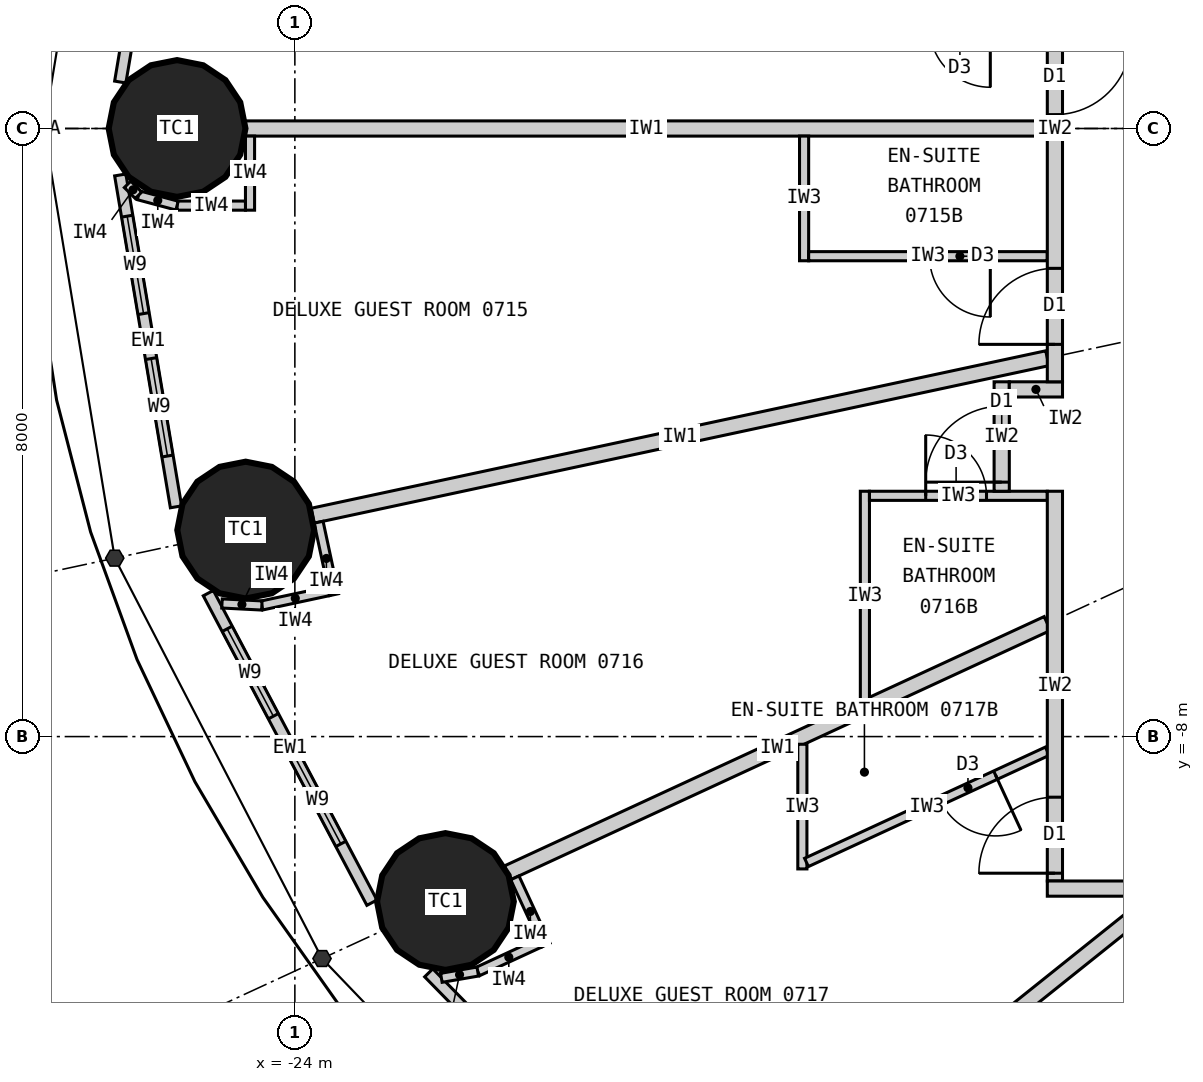
"""IFC4 building model, lengths in metres.
Left out: names, types, materials, properties, quantities, classifications, styles, units other than length and angle.
Written with IfcOpenShell. Run it as: python <this file> out.ifc"""

import sys

from ifc_helpers import new_model, si_unit, direction, frame, frame_2d, origin, origin_2d, place, context, subcontext, project, spatial, rectangle, circle, extrude, element, fill, save


model = new_model("IFC4")
c1 = context("Model", 3, precision=1e-05, world=origin(), true_north=direction((0.0, 1.0)))
c2 = subcontext(c1, "Body", "Model", "MODEL_VIEW")
j1 = project(units=[si_unit("LENGTHUNIT", "METRE"), si_unit("PLANEANGLEUNIT", "RADIAN")], contexts=[c1])
p1 = place(None, origin())
s1 = spatial("IfcSite", under=j1, at=p1, CompositionType="ELEMENT")
p2 = place(p1, origin())
s2 = spatial("IfcBuilding", under=s1, at=p2, CompositionType="ELEMENT")
p3 = place(p2, frame((0.0, 0.0, 36.0)))
s3 = spatial("IfcBuildingStorey", under=s2, at=p3, CompositionType="ELEMENT", Elevation=36.0)
for number, where, z_axis, x_axis in (
    (1, (-25.55, 0.0, 0.0), (0.0, 0.0, 1.0), (1.0, 0.0, 0.0)),
    (2, (-24.647, -5.283, 0.0), (0.0, 0.0, 1.0), (1.0, 0.0, 0.0)),
    (3, (-22.019, -10.17, 0.0), (0.0, 0.0, 1.0), (1.0, 0.0, 0.0)),
):
    element("IfcColumn", number, at=place(p3, frame(where, z_axis=z_axis, x_axis=x_axis)), inside=s3, PredefinedType="COLUMN", context=c2, shape_type="SweptSolid", body=[
        extrude(circle(Radius=0.9, at=origin_2d()), origin(), (0.0, 0.0, 1.0), 3.3),
    ])
p4 = place(p3, frame((-25.564, 4.978, 0.0), z_axis=(0.0, 0.0, 1.0), x_axis=(-0.165641751141, -0.986185991727, 0.0)))
e4 = element("IfcWall", 4, at=p4, inside=s3, PredefinedType="ELEMENTEDWALL", context=c2, shape_type="SweptSolid", body=[
    extrude(rectangle(XDim=4.428, YDim=0.15, at=frame_2d((2.214, 0.0))), origin(), (0.0, 0.0, 1.0), 3.12),
])
p5 = place(p4, frame((0.678, 0.0, 0.9)))
e5 = element("IfcOpeningElement", 5, at=p5, cuts=e4, PredefinedType="OPENING", context=c2, shape_type="SweptSolid", body=[
    extrude(rectangle(XDim=1.3, YDim=1.9, at=frame_2d((0.65, 0.95))), frame((0.0, 0.085, 0.0), z_axis=(0.0, -1.0, 0.0), x_axis=(1.0, 0.0, 0.0)), (0.0, 0.0, 1.0), 0.17),
])
p6 = place(p4, frame((2.578, 0.0, 0.9)))
e6 = element("IfcOpeningElement", 6, at=p6, cuts=e4, PredefinedType="OPENING", context=c2, shape_type="SweptSolid", body=[
    extrude(rectangle(XDim=1.3, YDim=1.9, at=frame_2d((0.65, 0.95))), frame((0.0, 0.085, 0.0), z_axis=(0.0, -1.0, 0.0), x_axis=(1.0, 0.0, 0.0)), (0.0, 0.0, 1.0), 0.17),
])
p7 = place(p3, frame((-26.297, -0.611, 0.0), z_axis=(0.0, 0.0, 1.0), x_axis=(0.165641751141, -0.986185991727, 0.0)))
e7 = element("IfcWall", 7, at=p7, inside=s3, PredefinedType="ELEMENTEDWALL", context=c2, shape_type="SweptSolid", body=[
    extrude(rectangle(XDim=4.428, YDim=0.15, at=frame_2d((2.214, 0.0))), origin(), (0.0, 0.0, 1.0), 3.12),
])
p8 = place(p7, frame((0.55, 0.0, 0.9)))
e8 = element("IfcOpeningElement", 8, at=p8, cuts=e7, PredefinedType="OPENING", context=c2, shape_type="SweptSolid", body=[
    extrude(rectangle(XDim=1.3, YDim=1.9, at=frame_2d((0.65, 0.95))), frame((0.0, 0.085, 0.0), z_axis=(0.0, -1.0, 0.0), x_axis=(1.0, 0.0, 0.0)), (0.0, 0.0, 1.0), 0.17),
])
p9 = place(p7, frame((2.45, 0.0, 0.9)))
e9 = element("IfcOpeningElement", 9, at=p9, cuts=e7, PredefinedType="OPENING", context=c2, shape_type="SweptSolid", body=[
    extrude(rectangle(XDim=1.3, YDim=1.9, at=frame_2d((0.65, 0.95))), frame((0.0, 0.085, 0.0), z_axis=(0.0, -1.0, 0.0), x_axis=(1.0, 0.0, 0.0)), (0.0, 0.0, 1.0), 0.17),
])
p10 = place(p3, frame((-25.139, -6.113, 0.0), z_axis=(0.0, 0.0, 1.0), x_axis=(0.467303182954, -0.884097129959, 0.0)))
e10 = element("IfcWall", 10, at=p10, inside=s3, PredefinedType="ELEMENTEDWALL", context=c2, shape_type="SweptSolid", body=[
    extrude(rectangle(XDim=4.606, YDim=0.15, at=frame_2d((2.303, 0.0))), origin(), (0.0, 0.0, 1.0), 3.12),
])
p11 = place(p10, frame((0.531, 0.0, 0.9)))
e11 = element("IfcOpeningElement", 11, at=p11, cuts=e10, PredefinedType="OPENING", context=c2, shape_type="SweptSolid", body=[
    extrude(rectangle(XDim=1.3, YDim=1.9, at=frame_2d((0.65, 0.95))), frame((0.0, 0.085, 0.0), z_axis=(0.0, -1.0, 0.0), x_axis=(1.0, 0.0, 0.0)), (0.0, 0.0, 1.0), 0.17),
])
p12 = place(p10, frame((2.432, 0.0, 0.9)))
e12 = element("IfcOpeningElement", 12, at=p12, cuts=e10, PredefinedType="OPENING", context=c2, shape_type="SweptSolid", body=[
    extrude(rectangle(XDim=1.3, YDim=1.9, at=frame_2d((0.65, 0.95))), frame((0.0, 0.085, 0.0), z_axis=(0.0, -1.0, 0.0), x_axis=(1.0, 0.0, 0.0)), (0.0, 0.0, 1.0), 0.17),
])
p13 = place(p3, frame((-22.239, -11.108, 0.0), z_axis=(0.0, 0.0, 1.0), x_axis=(0.699612594083, -0.714522370679, 0.0)))
e13 = element("IfcWall", 13, at=p13, inside=s3, PredefinedType="ELEMENTEDWALL", context=c2, shape_type="SweptSolid", body=[
    extrude(rectangle(XDim=4.896, YDim=0.15, at=frame_2d((2.448, 0.0))), origin(), (0.0, 0.0, 1.0), 3.12),
])
p14 = place(p13, frame((0.619, 0.0, 0.9)))
e14 = element("IfcOpeningElement", 14, at=p14, cuts=e13, PredefinedType="OPENING", context=c2, shape_type="SweptSolid", body=[
    extrude(rectangle(XDim=1.3, YDim=1.9, at=frame_2d((0.65, 0.95))), frame((0.0, 0.085, 0.0), z_axis=(0.0, -1.0, 0.0), x_axis=(1.0, 0.0, 0.0)), (0.0, 0.0, 1.0), 0.17),
])
p15 = place(p13, frame((2.519, 0.0, 0.9)))
e15 = element("IfcOpeningElement", 15, at=p15, cuts=e13, PredefinedType="OPENING", context=c2, shape_type="SweptSolid", body=[
    extrude(rectangle(XDim=1.3, YDim=1.9, at=frame_2d((0.65, 0.95))), frame((0.0, 0.085, 0.0), z_axis=(0.0, -1.0, 0.0), x_axis=(1.0, 0.0, 0.0)), (0.0, 0.0, 1.0), 0.17),
])
p16 = place(p3, frame((-14.1, 0.0, 0.0), z_axis=(0.0, 0.0, 1.0), x_axis=(-1.0, 0.0, 0.0)))
e16 = element("IfcWall", 16, at=p16, inside=s3, PredefinedType="PARTITIONING", context=c2, shape_type="SweptSolid", body=[
    extrude(rectangle(XDim=10.55, YDim=0.2, at=frame_2d((5.275, 0.0))), origin(), (0.0, 0.0, 1.0), 2.27),
])
p17 = place(p3, frame((-14.1, -3.022, 0.0), z_axis=(0.0, 0.0, 1.0), x_axis=(-0.977786510688, -0.209603290805, 0.0)))
e17 = element("IfcWall", 17, at=p17, inside=s3, PredefinedType="PARTITIONING", context=c2, shape_type="SweptSolid", body=[
    extrude(rectangle(XDim=9.887, YDim=0.2, at=frame_2d((4.943, 0.0))), origin(), (0.0, 0.0, 1.0), 2.32),
])
p18 = place(p3, frame((-14.1, -6.512, 0.0), z_axis=(0.0, 0.0, 1.0), x_axis=(-0.907842433118, -0.41931147925, 0.0)))
e18 = element("IfcWall", 18, at=p18, inside=s3, PredefinedType="PARTITIONING", context=c2, shape_type="SweptSolid", body=[
    extrude(rectangle(XDim=7.823, YDim=0.2, at=frame_2d((3.912, 0.0))), origin(), (0.0, 0.0, 1.0), 2.32),
])
p19 = place(p3, frame((-12.625, -10.1, 0.0), z_axis=(0.0, 0.0, 1.0), x_axis=(-0.780872884676, -0.624689953479, 0.0)))
e19 = element("IfcWall", 19, at=p19, inside=s3, PredefinedType="PARTITIONING", context=c2, shape_type="SweptSolid", body=[
    extrude(rectangle(XDim=5.845, YDim=0.2, at=frame_2d((2.922, 0.0))), origin(), (0.0, 0.0, 1.0), 2.32),
])
p20 = place(p3, frame((-17.3, -0.1, 0.0), z_axis=(0.0, 0.0, 1.0), x_axis=(0.0, -1.0, 0.0)))
e20 = element("IfcWall", 20, at=p20, inside=s3, PredefinedType="PARTITIONING", context=c2, shape_type="SweptSolid", body=[
    extrude(rectangle(XDim=1.64, YDim=0.12, at=frame_2d((0.82, 0.0))), origin(), (0.0, 0.0, 1.0), 3.12),
])
p21 = place(p3, frame((-14.1, -1.68, 0.0), z_axis=(0.0, 0.0, 1.0), x_axis=(-1.0, 0.0, 0.0)))
e21 = element("IfcWall", 21, at=p21, inside=s3, PredefinedType="PARTITIONING", context=c2, shape_type="SweptSolid", body=[
    extrude(rectangle(XDim=3.14, YDim=0.12, at=frame_2d((1.57, 0.0))), origin(), (0.0, 0.0, 1.0), 3.12),
])
p22 = place(p21, frame((0.75, 0.0, 0.0)))
e22 = element("IfcOpeningElement", 22, at=p22, cuts=e21, PredefinedType="OPENING", context=c2, shape_type="SweptSolid", body=[
    extrude(rectangle(XDim=0.8, YDim=2.1, at=frame_2d((0.4, 1.05))), frame((0.0, 0.07, 0.0), z_axis=(0.0, -1.0, 0.0), x_axis=(1.0, 0.0, 0.0)), (0.0, 0.0, 1.0), 0.14),
])
p23 = place(p3, frame((-16.5, -7.521, 0.0), z_axis=(0.0, 0.0, 1.0), x_axis=(0.0, 1.0, 0.0)))
e23 = element("IfcWall", 23, at=p23, inside=s3, PredefinedType="PARTITIONING", context=c2, shape_type="SweptSolid", body=[
    extrude(rectangle(XDim=2.749, YDim=0.12, at=frame_2d((1.374, 0.0))), origin(), (0.0, 0.0, 1.0), 3.12),
])
p24 = place(p3, frame((-14.1, -4.833, 0.0), z_axis=(0.0, 0.0, 1.0), x_axis=(-1.0, 0.0, 0.0)))
e24 = element("IfcWall", 24, at=p24, inside=s3, PredefinedType="PARTITIONING", context=c2, shape_type="SweptSolid", body=[
    extrude(rectangle(XDim=2.34, YDim=0.12, at=frame_2d((1.17, 0.0))), origin(), (0.0, 0.0, 1.0), 3.12),
])
p25 = place(p24, frame((0.8, 0.0, 0.0)))
e25 = element("IfcOpeningElement", 25, at=p25, cuts=e24, PredefinedType="OPENING", context=c2, shape_type="SweptSolid", body=[
    extrude(rectangle(XDim=0.8, YDim=2.1, at=frame_2d((0.4, 1.05))), frame((0.0, 0.07, 0.0), z_axis=(0.0, -1.0, 0.0), x_axis=(1.0, 0.0, 0.0)), (0.0, 0.0, 1.0), 0.14),
])
p26 = place(p3, frame((-17.323, -8.101, 0.0), z_axis=(0.0, 0.0, 1.0), x_axis=(0.0, -1.0, 0.0)))
e26 = element("IfcWall", 26, at=p26, inside=s3, PredefinedType="PARTITIONING", context=c2, shape_type="SweptSolid", body=[
    extrude(rectangle(XDim=1.64, YDim=0.12, at=frame_2d((0.82, 0.0))), origin(), (0.0, 0.0, 1.0), 3.12),
])
p27 = place(p3, frame((-14.1, -8.193, 0.0), z_axis=(0.0, 0.0, 1.0), x_axis=(-0.907836493557, -0.419324338628, 0.0)))
e27 = element("IfcWall", 27, at=p27, inside=s3, PredefinedType="PARTITIONING", context=c2, shape_type="SweptSolid", body=[
    extrude(rectangle(XDim=3.49, YDim=0.12, at=frame_2d((1.745, 0.0))), origin(), (0.0, 0.0, 1.0), 3.12),
])
p28 = place(p27, frame((0.75, 0.0, 0.0)))
e28 = element("IfcOpeningElement", 28, at=p28, cuts=e27, PredefinedType="OPENING", context=c2, shape_type="SweptSolid", body=[
    extrude(rectangle(XDim=0.8, YDim=2.1, at=frame_2d((0.4, 1.05))), frame((0.0, 0.07, 0.0), z_axis=(0.0, -1.0, 0.0), x_axis=(1.0, 0.0, 0.0)), (0.0, 0.0, 1.0), 0.14),
])
p29 = place(p3, frame((-14.7, -3.333, 0.0), z_axis=(0.0, 0.0, 1.0), x_axis=(0.0, -1.0, 0.0)))
e29 = element("IfcWall", 29, at=p29, inside=s3, PredefinedType="PARTITIONING", context=c2, shape_type="SweptSolid", body=[
    extrude(rectangle(XDim=1.44, YDim=0.2, at=frame_2d((0.72, 0.0))), origin(), (0.0, 0.0, 1.0), 3.12),
])
p30 = place(p29, frame((0.32, 0.0, 0.0)))
e30 = element("IfcOpeningElement", 30, at=p30, cuts=e29, PredefinedType="OPENING", context=c2, shape_type="SweptSolid", body=[
    extrude(rectangle(XDim=1.0, YDim=2.2, at=frame_2d((0.5, 1.1))), frame((0.0, 0.11, 0.0), z_axis=(0.0, -1.0, 0.0), x_axis=(1.0, 0.0, 0.0)), (0.0, 0.0, 1.0), 0.22),
])
p31 = place(p3, frame((-13.9, -3.433, 0.0), z_axis=(0.0, 0.0, 1.0), x_axis=(-1.0, 0.0, 0.0)))
e31 = element("IfcWall", 31, at=p31, inside=s3, PredefinedType="PARTITIONING", context=c2, shape_type="SweptSolid", body=[
    extrude(rectangle(XDim=0.7, YDim=0.2, at=frame_2d((0.35, 0.0))), origin(), (0.0, 0.0, 1.0), 2.32),
])
p32 = place(p3, frame((-14.0, 3.333, 0.0), z_axis=(0.0, 0.0, 1.0), x_axis=(0.0, -1.0, 0.0)))
e32 = element("IfcWall", 32, at=p32, inside=s3, PredefinedType="PARTITIONING", context=c2, shape_type="SweptSolid", body=[
    extrude(rectangle(XDim=6.665, YDim=0.2, at=frame_2d((3.333, 0.0))), origin(), (0.0, 0.0, 1.0), 3.12),
])
p33 = place(p32, frame((2.15, 0.0, 0.0)))
e33 = element("IfcOpeningElement", 33, at=p33, cuts=e32, PredefinedType="OPENING", context=c2, shape_type="SweptSolid", body=[
    extrude(rectangle(XDim=1.0, YDim=2.2, at=frame_2d((0.5, 1.1))), frame((0.0, 0.11, 0.0), z_axis=(0.0, -1.0, 0.0), x_axis=(1.0, 0.0, 0.0)), (0.0, 0.0, 1.0), 0.22),
])
p34 = place(p32, frame((5.173, 0.0, 0.0)))
e34 = element("IfcOpeningElement", 34, at=p34, cuts=e32, PredefinedType="OPENING", context=c2, shape_type="SweptSolid", body=[
    extrude(rectangle(XDim=1.0, YDim=2.2, at=frame_2d((0.5, 1.1))), frame((0.0, 0.11, 0.0), z_axis=(0.0, -1.0, 0.0), x_axis=(1.0, 0.0, 0.0)), (0.0, 0.0, 1.0), 0.22),
])
p35 = place(p3, frame((-14.0, -4.772, 0.0), z_axis=(0.0, 0.0, 1.0), x_axis=(0.0, -1.0, 0.0)))
e35 = element("IfcWall", 35, at=p35, inside=s3, PredefinedType="PARTITIONING", context=c2, shape_type="SweptSolid", body=[
    extrude(rectangle(XDim=5.127, YDim=0.2, at=frame_2d((2.564, 0.0))), origin(), (0.0, 0.0, 1.0), 3.12),
])
p36 = place(p35, frame((4.025, 0.0, 0.0)))
e36 = element("IfcOpeningElement", 36, at=p36, cuts=e35, PredefinedType="OPENING", context=c2, shape_type="SweptSolid", body=[
    extrude(rectangle(XDim=1.0, YDim=2.2, at=frame_2d((0.5, 1.1))), frame((0.0, 0.11, 0.0), z_axis=(0.0, -1.0, 0.0), x_axis=(1.0, 0.0, 0.0)), (0.0, 0.0, 1.0), 0.22),
])
p37 = place(p3, frame((-3.499, -10.0, 0.0), z_axis=(0.0, 0.0, 1.0), x_axis=(-1.0, 0.0, 0.0)))
e37 = element("IfcWall", 37, at=p37, inside=s3, PredefinedType="PARTITIONING", context=c2, shape_type="SweptSolid", body=[
    extrude(rectangle(XDim=10.602, YDim=0.2, at=frame_2d((5.301, 0.0))), origin(), (0.0, 0.0, 1.0), 3.12),
])
p38 = place(p37, frame((4.846, 0.0, 0.0)))
e38 = element("IfcOpeningElement", 38, at=p38, cuts=e37, PredefinedType="OPENING", context=c2, shape_type="SweptSolid", body=[
    extrude(rectangle(XDim=1.0, YDim=2.2, at=frame_2d((0.5, 1.1))), frame((0.0, 0.11, 0.0), z_axis=(0.0, -1.0, 0.0), x_axis=(1.0, 0.0, 0.0)), (0.0, 0.0, 1.0), 0.22),
])
p39 = place(p3, frame((-24.59, -0.1, 0.0), z_axis=(0.0, 0.0, 1.0), x_axis=(0.0, -1.0, 0.0)))
e39 = element("IfcWall", 39, at=p39, inside=s3, PredefinedType="PARTITIONING", context=c2, shape_type="SweptSolid", body=[
    extrude(rectangle(XDim=0.974, YDim=0.12, at=frame_2d((0.487, 0.0))), origin(), (0.0, 0.0, 1.0), 3.12),
])
p40 = place(p3, frame((-24.65, -1.015, 0.0), z_axis=(0.0, 0.0, 1.0), x_axis=(-1.0, 0.0, 0.0)))
e40 = element("IfcWall", 40, at=p40, inside=s3, PredefinedType="PARTITIONING", context=c2, shape_type="SweptSolid", body=[
    extrude(rectangle(XDim=0.9, YDim=0.12, at=frame_2d((0.45, 0.0))), origin(), (0.0, 0.0, 1.0), 3.12),
])
p41 = place(p3, frame((-25.55, -1.015, 0.0), z_axis=(0.0, 0.0, 1.0), x_axis=(-0.96590239779, 0.258906465625, 0.0)))
e41 = element("IfcWall", 41, at=p41, inside=s3, PredefinedType="PARTITIONING", context=c2, shape_type="SweptSolid", body=[
    extrude(rectangle(XDim=0.525, YDim=0.12, at=frame_2d((0.263, 0.0))), origin(), (0.0, 0.0, 1.0), 3.12),
])
p42 = place(p3, frame((-26.057, -0.879, 0.0), z_axis=(0.0, 0.0, 1.0), x_axis=(-0.707106781187, 0.707106781187, 0.0)))
e42 = element("IfcWall", 42, at=p42, inside=s3, PredefinedType="PARTITIONING", context=c2, shape_type="SweptSolid", body=[
    extrude(rectangle(XDim=0.204, YDim=0.12, at=frame_2d((0.102, 0.0))), origin(), (0.0, 0.0, 1.0), 3.12),
])
p43 = place(p3, frame((-23.687, -5.18, 0.0), z_axis=(0.0, 0.0, 1.0), x_axis=(0.209443540911, -0.977820741839, 0.0)))
e43 = element("IfcWall", 43, at=p43, inside=s3, PredefinedType="PARTITIONING", context=c2, shape_type="SweptSolid", body=[
    extrude(rectangle(XDim=0.975, YDim=0.12, at=frame_2d((0.487, 0.0))), origin(), (0.0, 0.0, 1.0), 3.12),
])
p44 = place(p3, frame((-23.554, -6.087, 0.0), z_axis=(0.0, 0.0, 1.0), x_axis=(-0.977762694187, -0.209714362543, 0.0)))
e44 = element("IfcWall", 44, at=p44, inside=s3, PredefinedType="PARTITIONING", context=c2, shape_type="SweptSolid", body=[
    extrude(rectangle(XDim=0.9, YDim=0.12, at=frame_2d((0.45, 0.0))), origin(), (0.0, 0.0, 1.0), 3.12),
])
p45 = place(p3, frame((-24.434, -6.275, 0.0), z_axis=(0.0, 0.0, 1.0), x_axis=(-0.998714959873, 0.050679669751, 0.0)))
e45 = element("IfcWall", 45, at=p45, inside=s3, PredefinedType="PARTITIONING", context=c2, shape_type="SweptSolid", body=[
    extrude(rectangle(XDim=0.525, YDim=0.12, at=frame_2d((0.263, 0.0))), origin(), (0.0, 0.0, 1.0), 3.12),
])
p46 = place(p3, frame((-21.106, -9.858, 0.0), z_axis=(0.0, 0.0, 1.0), x_axis=(0.419344098106, -0.907827366509, 0.0)))
e46 = element("IfcWall", 46, at=p46, inside=s3, PredefinedType="PARTITIONING", context=c2, shape_type="SweptSolid", body=[
    extrude(rectangle(XDim=0.975, YDim=0.12, at=frame_2d((0.487, 0.0))), origin(), (0.0, 0.0, 1.0), 3.12),
])
p47 = place(p3, frame((-20.777, -10.714, 0.0), z_axis=(0.0, 0.0, 1.0), x_axis=(-0.907832324198, -0.419333365166, 0.0)))
e47 = element("IfcWall", 47, at=p47, inside=s3, PredefinedType="PARTITIONING", context=c2, shape_type="SweptSolid", body=[
    extrude(rectangle(XDim=0.9, YDim=0.12, at=frame_2d((0.45, 0.0))), origin(), (0.0, 0.0, 1.0), 3.12),
])
p48 = place(p3, frame((-21.594, -11.091, 0.0), z_axis=(0.0, 0.0, 1.0), x_axis=(-0.985483306792, -0.169772353566, 0.0)))
e48 = element("IfcWall", 48, at=p48, inside=s3, PredefinedType="PARTITIONING", context=c2, shape_type="SweptSolid", body=[
    extrude(rectangle(XDim=0.486, YDim=0.12, at=frame_2d((0.243, 0.0))), origin(), (0.0, 0.0, 1.0), 3.12),
])
p49 = place(p8, origin())
e49 = element("IfcWindow", 49, at=p49, inside=s3, PartitioningType="SINGLE_PANEL", PredefinedType="WINDOW", context=c2, shape_type="SweptSolid", body=[
    extrude(rectangle(XDim=1.3, YDim=1.9, at=frame_2d((0.65, 0.95))), frame((0.0, 0.03, 0.0), z_axis=(0.0, -1.0, 0.0), x_axis=(1.0, 0.0, 0.0)), (0.0, 0.0, 1.0), 0.06),
])
fill(e8, e49)
p50 = place(p9, origin())
e50 = element("IfcWindow", 50, at=p50, inside=s3, PartitioningType="SINGLE_PANEL", PredefinedType="WINDOW", context=c2, shape_type="SweptSolid", body=[
    extrude(rectangle(XDim=1.3, YDim=1.9, at=frame_2d((0.65, 0.95))), frame((0.0, 0.03, 0.0), z_axis=(0.0, -1.0, 0.0), x_axis=(1.0, 0.0, 0.0)), (0.0, 0.0, 1.0), 0.06),
])
fill(e9, e50)
p51 = place(p11, origin())
e51 = element("IfcWindow", 51, at=p51, inside=s3, PartitioningType="SINGLE_PANEL", PredefinedType="WINDOW", context=c2, shape_type="SweptSolid", body=[
    extrude(rectangle(XDim=1.3, YDim=1.9, at=frame_2d((0.65, 0.95))), frame((0.0, 0.03, 0.0), z_axis=(0.0, -1.0, 0.0), x_axis=(1.0, 0.0, 0.0)), (0.0, 0.0, 1.0), 0.06),
])
fill(e11, e51)
p52 = place(p12, origin())
e52 = element("IfcWindow", 52, at=p52, inside=s3, PartitioningType="SINGLE_PANEL", PredefinedType="WINDOW", context=c2, shape_type="SweptSolid", body=[
    extrude(rectangle(XDim=1.3, YDim=1.9, at=frame_2d((0.65, 0.95))), frame((0.0, 0.03, 0.0), z_axis=(0.0, -1.0, 0.0), x_axis=(1.0, 0.0, 0.0)), (0.0, 0.0, 1.0), 0.06),
])
fill(e12, e52)
p53 = place(p33, origin())
e53 = element("IfcDoor", 53, at=p53, inside=s3, OperationType="SINGLE_SWING_LEFT", PredefinedType="DOOR", context=c2, shape_type="SweptSolid", body=[
    extrude(rectangle(XDim=1.0, YDim=2.2, at=frame_2d((0.5, 1.1))), frame((0.0, 0.025, 0.0), z_axis=(0.0, -1.0, 0.0), x_axis=(1.0, 0.0, 0.0)), (0.0, 0.0, 1.0), 0.05),
])
fill(e33, e53)
p54 = place(p22, origin())
e54 = element("IfcDoor", 54, at=p54, inside=s3, OperationType="SINGLE_SWING_LEFT", PredefinedType="DOOR", context=c2, shape_type="SweptSolid", body=[
    extrude(rectangle(XDim=0.8, YDim=2.1, at=frame_2d((0.4, 1.05))), frame((0.0, 0.025, 0.0), z_axis=(0.0, -1.0, 0.0), x_axis=(1.0, 0.0, 0.0)), (0.0, 0.0, 1.0), 0.05),
])
fill(e22, e54)
p55 = place(p34, origin())
e55 = element("IfcDoor", 55, at=p55, inside=s3, OperationType="SINGLE_SWING_RIGHT", PredefinedType="DOOR", context=c2, shape_type="SweptSolid", body=[
    extrude(rectangle(XDim=1.0, YDim=2.2, at=frame_2d((0.5, 1.1))), frame((0.0, 0.025, 0.0), z_axis=(0.0, -1.0, 0.0), x_axis=(1.0, 0.0, 0.0)), (0.0, 0.0, 1.0), 0.05),
])
fill(e34, e55)
p56 = place(p25, origin())
e56 = element("IfcDoor", 56, at=p56, inside=s3, OperationType="SINGLE_SWING_RIGHT", PredefinedType="DOOR", context=c2, shape_type="SweptSolid", body=[
    extrude(rectangle(XDim=0.8, YDim=2.1, at=frame_2d((0.4, 1.05))), frame((0.0, 0.025, 0.0), z_axis=(0.0, -1.0, 0.0), x_axis=(1.0, 0.0, 0.0)), (0.0, 0.0, 1.0), 0.05),
])
fill(e25, e56)
p57 = place(p30, origin())
e57 = element("IfcDoor", 57, at=p57, inside=s3, OperationType="SINGLE_SWING_RIGHT", PredefinedType="DOOR", context=c2, shape_type="SweptSolid", body=[
    extrude(rectangle(XDim=1.0, YDim=2.2, at=frame_2d((0.5, 1.1))), frame((0.0, 0.025, 0.0), z_axis=(0.0, -1.0, 0.0), x_axis=(1.0, 0.0, 0.0)), (0.0, 0.0, 1.0), 0.05),
])
fill(e30, e57)
p58 = place(p28, origin())
e58 = element("IfcDoor", 58, at=p58, inside=s3, OperationType="SINGLE_SWING_LEFT", PredefinedType="DOOR", context=c2, shape_type="SweptSolid", body=[
    extrude(rectangle(XDim=0.8, YDim=2.1, at=frame_2d((0.4, 1.05))), frame((0.0, 0.025, 0.0), z_axis=(0.0, -1.0, 0.0), x_axis=(1.0, 0.0, 0.0)), (0.0, 0.0, 1.0), 0.05),
])
fill(e28, e58)
p59 = place(p36, origin())
e59 = element("IfcDoor", 59, at=p59, inside=s3, OperationType="SINGLE_SWING_RIGHT", PredefinedType="DOOR", context=c2, shape_type="SweptSolid", body=[
    extrude(rectangle(XDim=1.0, YDim=2.2, at=frame_2d((0.5, 1.1))), frame((0.0, 0.025, 0.0), z_axis=(0.0, -1.0, 0.0), x_axis=(1.0, 0.0, 0.0)), (0.0, 0.0, 1.0), 0.05),
])
fill(e36, e59)
save(model, sys.argv[1])
